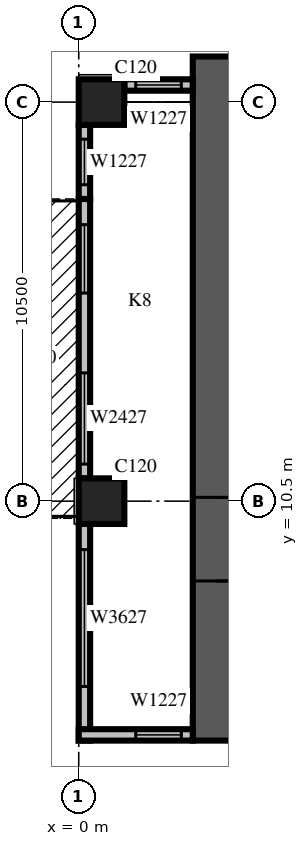
"""IFC4 building model, lengths in metres.
Left out: names, types, materials, properties, quantities, classifications, styles, units other than length and angle.
Written with IfcOpenShell. Run it as: python <this file> out.ifc"""

import sys

from ifc_helpers import new_model, si_unit, direction, frame, frame_2d, origin, origin_2d, place, context, subcontext, project, spatial, rectangle, extrude, source, transform, mapped, element, fill, save


model = new_model("IFC4")
c1 = context("Model", 3, precision=1e-05, world=origin(), true_north=direction((0.0, 1.0)))
c2 = subcontext(c1, "Body", "Model", "MODEL_VIEW")
j1 = project(units=[si_unit("LENGTHUNIT", "METRE"), si_unit("PLANEANGLEUNIT", "RADIAN")], contexts=[c1])
p1 = place(None, origin())
s1 = spatial("IfcSite", under=j1, at=p1, CompositionType="ELEMENT")
p2 = place(p1, origin())
s2 = spatial("IfcBuilding", under=s1, at=p2, CompositionType="ELEMENT")
p3 = place(p2, frame((0.0, 0.0, 74.1)))
s3 = spatial("IfcBuildingStorey", under=s2, at=p3, CompositionType="ELEMENT", Elevation=74.1)
m1 = source(origin(), c2, "Body", "SweptSolid", [
    extrude(rectangle(XDim=1.2, YDim=1.2, at=origin_2d()), origin(), (0.0, 0.0, 1.0), 4.2),
])
for number, where, z_axis, x_axis in (
    (1, (0.6, 10.5, 0.0), (0.0, 0.0, 1.0), (1.0, 0.0, 0.0)),
    (2, (0.6, 21.0, 0.0), (0.0, 0.0, 1.0), (1.0, 0.0, 0.0)),
):
    element("IfcColumn", number, at=place(p3, frame(where, z_axis=z_axis, x_axis=x_axis)), inside=s3, PredefinedType="COLUMN", context=c2, shape_type="MappedRepresentation", body=[
        mapped(m1, transform((0.0, 0.0, 0.0), scale=1.0)),
    ])
m2 = source(origin(), c2, "Body", "SweptSolid", [
    extrude(rectangle(XDim=18.0, YDim=1.2, at=frame_2d((9.0, 0.0))), origin(), (0.0, 0.0, 1.0), 4.2),
])
p4 = place(p3, frame((3.6, 4.2, 0.0), z_axis=(0.0, 0.0, 1.0), x_axis=(0.0, 1.0, 0.0)))
e3 = element("IfcWall", 3, at=p4, inside=s3, PredefinedType="SHEAR", context=c2, shape_type="MappedRepresentation", body=[
    mapped(m2, transform((0.0, 0.0, 0.0), scale=1.0)),
])
m3 = source(origin(), c2, "Body", "SweptSolid", [
    extrude(rectangle(XDim=2.2, YDim=2.1, at=frame_2d((1.1, 1.05))), frame((0.0, 0.61, 0.0), z_axis=(0.0, -1.0, 0.0), x_axis=(1.0, 0.0, 0.0)), (0.0, 0.0, 1.0), 1.22),
])
p5 = place(p4, frame((4.2, 0.0, 0.0)))
e4 = element("IfcOpeningElement", 4, at=p5, cuts=e3, PredefinedType="OPENING", context=c2, shape_type="MappedRepresentation", body=[
    mapped(m3, transform((0.0, 0.0, 0.0), scale=1.0)),
])
m4 = source(origin(), c2, "Body", "SweptSolid", [
    extrude(rectangle(XDim=1.8, YDim=0.3, at=frame_2d((0.9, 0.0))), origin(), (0.0, 0.0, 1.0), 3.8),
])
p6 = place(p3, frame((3.0, 21.45, 0.0), z_axis=(0.0, 0.0, 1.0), x_axis=(-1.0, 0.0, 0.0)))
e5 = element("IfcWall", 5, at=p6, inside=s3, PredefinedType="STANDARD", context=c2, shape_type="MappedRepresentation", body=[
    mapped(m4, transform((0.0, 0.0, 0.0), scale=1.0)),
])
m5 = source(origin(), c2, "Body", "SweptSolid", [
    extrude(rectangle(XDim=1.2, YDim=2.7, at=frame_2d((0.6, 1.35))), frame((0.0, 0.16, 0.0), z_axis=(0.0, -1.0, 0.0), x_axis=(1.0, 0.0, 0.0)), (0.0, 0.0, 1.0), 0.32),
])
p7 = place(p6, frame((0.3, 0.0, 0.6)))
e6 = element("IfcOpeningElement", 6, at=p7, cuts=e5, PredefinedType="OPENING", context=c2, shape_type="MappedRepresentation", body=[
    mapped(m5, transform((0.0, 0.0, 0.0), scale=1.0)),
])
m6 = source(origin(), c2, "Body", "SweptSolid", [
    extrude(rectangle(XDim=1.95, YDim=0.3, at=frame_2d((0.975, 0.0))), origin(), (0.0, 0.0, 1.0), 3.8),
])
p8 = place(p3, frame((0.15, 20.4, 0.0), z_axis=(0.0, 0.0, 1.0), x_axis=(0.0, -1.0, 0.0)))
e7 = element("IfcWall", 7, at=p8, inside=s3, PredefinedType="STANDARD", context=c2, shape_type="MappedRepresentation", body=[
    mapped(m6, transform((0.0, 0.0, 0.0), scale=1.0)),
])
p9 = place(p8, frame((0.375, 0.0, 0.6)))
e8 = element("IfcOpeningElement", 8, at=p9, cuts=e7, PredefinedType="OPENING", context=c2, shape_type="MappedRepresentation", body=[
    mapped(m5, transform((0.0, 0.0, 0.0), scale=1.0)),
])
m7 = source(origin(), c2, "Body", "SweptSolid", [
    extrude(rectangle(XDim=7.35, YDim=0.3, at=frame_2d((3.675, 0.0))), origin(), (0.0, 0.0, 1.0), 3.8),
])
p10 = place(p3, frame((0.15, 18.45, 0.0), z_axis=(0.0, 0.0, 1.0), x_axis=(0.0, -1.0, 0.0)))
e9 = element("IfcWall", 9, at=p10, inside=s3, PredefinedType="STANDARD", context=c2, shape_type="MappedRepresentation", body=[
    mapped(m7, transform((0.0, 0.0, 0.0), scale=1.0)),
])
m8 = source(origin(), c2, "Body", "SweptSolid", [
    extrude(rectangle(XDim=1.8, YDim=2.4, at=frame_2d((0.9, 1.2))), frame((0.0, 0.16, 0.0), z_axis=(0.0, -1.0, 0.0), x_axis=(1.0, 0.0, 0.0)), (0.0, 0.0, 1.0), 0.32),
])
p11 = place(p10, frame((0.675, 0.0, 0.0)))
e10 = element("IfcOpeningElement", 10, at=p11, cuts=e9, PredefinedType="OPENING", context=c2, shape_type="MappedRepresentation", body=[
    mapped(m8, transform((0.0, 0.0, 0.0), scale=1.0)),
])
m9 = source(origin(), c2, "Body", "SweptSolid", [
    extrude(rectangle(XDim=2.4, YDim=2.7, at=frame_2d((1.2, 1.35))), frame((0.0, 0.16, 0.0), z_axis=(0.0, -1.0, 0.0), x_axis=(1.0, 0.0, 0.0)), (0.0, 0.0, 1.0), 0.32),
])
p12 = place(p10, frame((4.575, 0.0, 0.6)))
e11 = element("IfcOpeningElement", 11, at=p12, cuts=e9, PredefinedType="OPENING", context=c2, shape_type="MappedRepresentation", body=[
    mapped(m9, transform((0.0, 0.0, 0.0), scale=1.0)),
])
p13 = place(p3, frame((0.15, 9.9, 0.0), z_axis=(0.0, 0.0, 1.0), x_axis=(0.0, -1.0, 0.0)))
e12 = element("IfcWall", 12, at=p13, inside=s3, PredefinedType="STANDARD", context=c2, shape_type="SweptSolid", body=[
    extrude(rectangle(XDim=5.7, YDim=0.3, at=frame_2d((2.85, 0.0))), origin(), (0.0, 0.0, 1.0), 3.8),
])
m10 = source(origin(), c2, "Body", "SweptSolid", [
    extrude(rectangle(XDim=3.6, YDim=2.7, at=frame_2d((1.8, 1.35))), frame((0.0, 0.16, 0.0), z_axis=(0.0, -1.0, 0.0), x_axis=(1.0, 0.0, 0.0)), (0.0, 0.0, 1.0), 0.32),
])
p14 = place(p13, frame((0.675, 0.0, 0.6)))
e13 = element("IfcOpeningElement", 13, at=p14, cuts=e12, PredefinedType="OPENING", context=c2, shape_type="MappedRepresentation", body=[
    mapped(m10, transform((0.0, 0.0, 0.0), scale=1.0)),
])
m11 = source(origin(), c2, "Body", "SweptSolid", [
    extrude(rectangle(XDim=3.0, YDim=0.3, at=frame_2d((1.5, 0.0))), origin(), (0.0, 0.0, 1.0), 3.8),
])
p15 = place(p3, frame((0.0, 4.35, 0.0), z_axis=(0.0, 0.0, 1.0), x_axis=(1.0, 0.0, 0.0)))
e14 = element("IfcWall", 14, at=p15, inside=s3, PredefinedType="STANDARD", context=c2, shape_type="MappedRepresentation", body=[
    mapped(m11, transform((0.0, 0.0, 0.0), scale=1.0)),
])
p16 = place(p15, frame((1.5, 0.0, 0.6)))
e15 = element("IfcOpeningElement", 15, at=p16, cuts=e14, PredefinedType="OPENING", context=c2, shape_type="MappedRepresentation", body=[
    mapped(m5, transform((0.0, 0.0, 0.0), scale=1.0)),
])
m12 = source(origin(), c2, "Body", "SweptSolid", [
    extrude(rectangle(XDim=1.2, YDim=2.7, at=frame_2d((0.6, 1.35))), frame((0.0, 0.03, 0.0), z_axis=(0.0, -1.0, 0.0), x_axis=(1.0, 0.0, 0.0)), (0.0, 0.0, 1.0), 0.06),
])
p17 = place(p7, origin())
e16 = element("IfcWindow", 16, at=p17, inside=s3, PartitioningType="SINGLE_PANEL", PredefinedType="WINDOW", context=c2, shape_type="MappedRepresentation", body=[
    mapped(m12, transform((0.0, 0.0, 0.0), scale=1.0)),
])
fill(e6, e16)
p18 = place(p9, origin())
e17 = element("IfcWindow", 17, at=p18, inside=s3, PartitioningType="SINGLE_PANEL", PredefinedType="WINDOW", context=c2, shape_type="MappedRepresentation", body=[
    mapped(m12, transform((0.0, 0.0, 0.0), scale=1.0)),
])
fill(e8, e17)
m13 = source(origin(), c2, "Body", "SweptSolid", [
    extrude(rectangle(XDim=1.8, YDim=2.4, at=frame_2d((0.9, 1.2))), frame((0.0, 0.025, 0.0), z_axis=(0.0, -1.0, 0.0), x_axis=(1.0, 0.0, 0.0)), (0.0, 0.0, 1.0), 0.05),
])
p19 = place(p11, origin())
e18 = element("IfcDoor", 18, at=p19, inside=s3, OperationType="SLIDING_TO_LEFT", PredefinedType="DOOR", context=c2, shape_type="MappedRepresentation", body=[
    mapped(m13, transform((0.0, 0.0, 0.0), scale=1.0)),
])
fill(e10, e18)
m14 = source(origin(), c2, "Body", "SweptSolid", [
    extrude(rectangle(XDim=2.4, YDim=2.7, at=frame_2d((1.2, 1.35))), frame((0.0, 0.03, 0.0), z_axis=(0.0, -1.0, 0.0), x_axis=(1.0, 0.0, 0.0)), (0.0, 0.0, 1.0), 0.06),
])
p20 = place(p12, origin())
e19 = element("IfcWindow", 19, at=p20, inside=s3, PartitioningType="SINGLE_PANEL", PredefinedType="WINDOW", context=c2, shape_type="MappedRepresentation", body=[
    mapped(m14, transform((0.0, 0.0, 0.0), scale=1.0)),
])
fill(e11, e19)
m15 = source(origin(), c2, "Body", "SweptSolid", [
    extrude(rectangle(XDim=3.6, YDim=2.7, at=frame_2d((1.8, 1.35))), frame((0.0, 0.03, 0.0), z_axis=(0.0, -1.0, 0.0), x_axis=(1.0, 0.0, 0.0)), (0.0, 0.0, 1.0), 0.06),
])
p21 = place(p14, origin())
e20 = element("IfcWindow", 20, at=p21, inside=s3, PartitioningType="SINGLE_PANEL", PredefinedType="WINDOW", context=c2, shape_type="MappedRepresentation", body=[
    mapped(m15, transform((0.0, 0.0, 0.0), scale=1.0)),
])
fill(e13, e20)
p22 = place(p16, origin())
e21 = element("IfcWindow", 21, at=p22, inside=s3, PartitioningType="SINGLE_PANEL", PredefinedType="WINDOW", context=c2, shape_type="MappedRepresentation", body=[
    mapped(m12, transform((0.0, 0.0, 0.0), scale=1.0)),
])
fill(e15, e21)
m16 = source(origin(), c2, "Body", "SweptSolid", [
    extrude(rectangle(XDim=2.2, YDim=2.1, at=frame_2d((1.1, 1.05))), frame((0.0, 0.025, 0.0), z_axis=(0.0, -1.0, 0.0), x_axis=(1.0, 0.0, 0.0)), (0.0, 0.0, 1.0), 0.05),
])
p23 = place(p5, origin())
e22 = element("IfcDoor", 22, at=p23, inside=s3, OperationType="DOUBLE_DOOR_SINGLE_SWING", PredefinedType="DOOR", context=c2, shape_type="MappedRepresentation", body=[
    mapped(m16, transform((0.0, 0.0, 0.0), scale=1.0)),
])
fill(e4, e22)
save(model, sys.argv[1])
